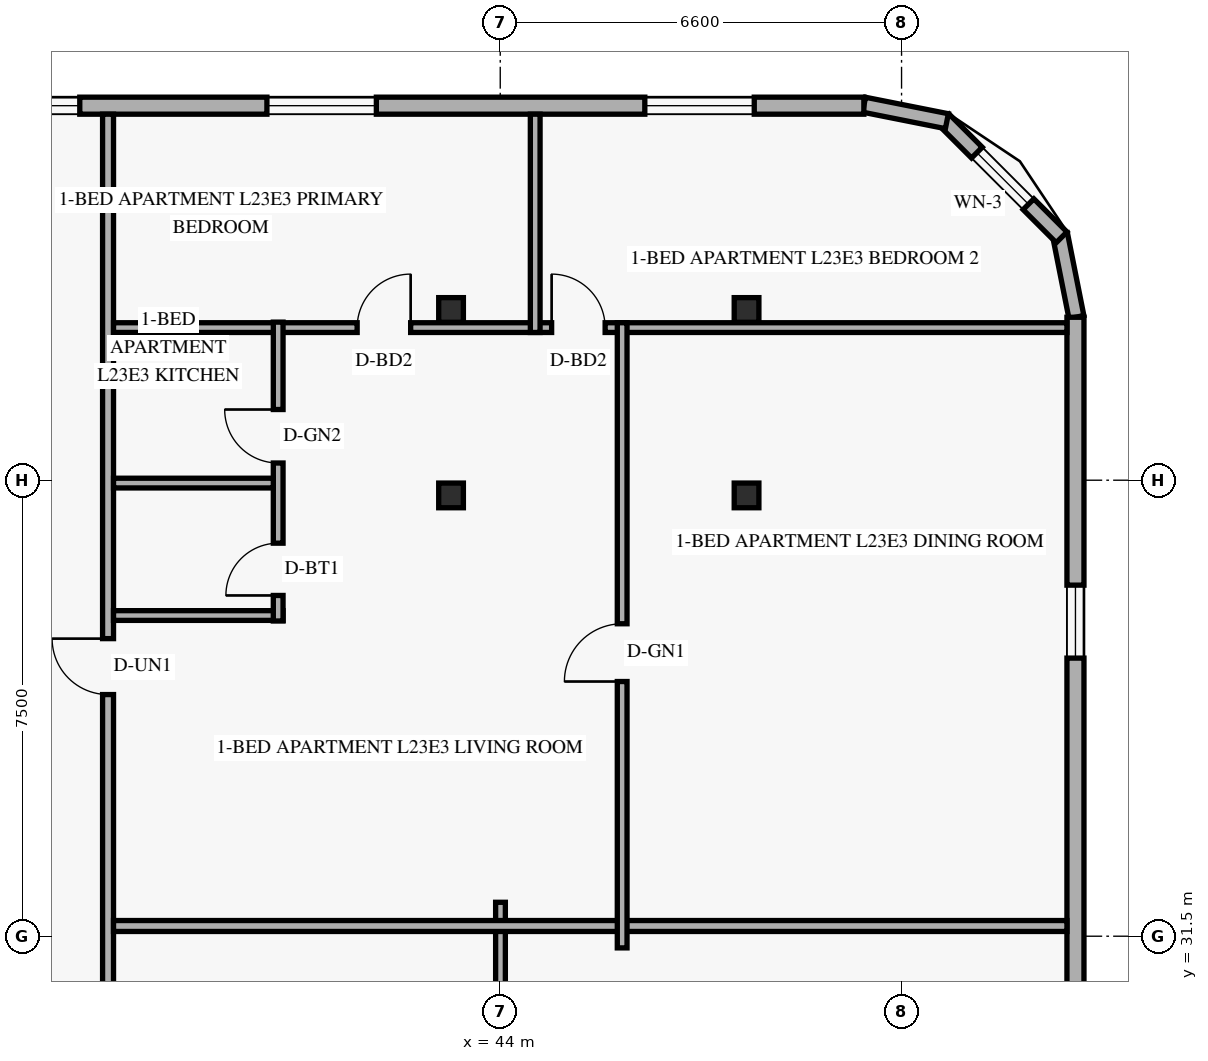
"""IFC4 building model, lengths in metres.
Left out: names, types, materials, properties, quantities, classifications, styles, units other than length and angle.
Written with IfcOpenShell. Run it as: python <this file> out.ifc"""

import sys

from ifc_helpers import new_model, si_unit, direction, frame, frame_2d, origin, origin_2d, place, context, subcontext, project, spatial, rectangle, hollow_rectangle, extrude, element, fill, save


model = new_model("IFC4")
c1 = context("Model", 3, precision=1e-05, world=origin(), true_north=direction((0.0, 1.0)))
c2 = subcontext(c1, "Body", "Model", "MODEL_VIEW")
j1 = project(units=[si_unit("LENGTHUNIT", "METRE"), si_unit("PLANEANGLEUNIT", "RADIAN")], contexts=[c1])
p1 = place(None, origin())
s1 = spatial("IfcSite", under=j1, at=p1, CompositionType="ELEMENT")
p2 = place(p1, origin())
s2 = spatial("IfcBuilding", under=s1, at=p2, CompositionType="ELEMENT")
p3 = place(p2, frame((0.0, 0.0, 91.2)))
s3 = spatial("IfcBuildingStorey", under=s2, at=p3, CompositionType="ELEMENT", Elevation=91.2)
for number, where, z_axis, x_axis in (
    (1, (43.128, 38.75, 0.0), (0.035, 0.0, 0.999), (0.0, 1.0, 0.0)),
    (2, (43.128, 41.8, 0.0), (0.035, 0.0, 0.999), (0.0, 1.0, 0.0)),
):
    element("IfcColumn", number, at=place(p3, frame(where, z_axis=z_axis, x_axis=x_axis)), inside=s3, PredefinedType="COLUMN", context=c2, shape_type="SweptSolid", body=[
        extrude(hollow_rectangle(XDim=0.406, YDim=0.406, WallThickness=0.016, at=origin_2d()), origin(), (0.0, 0.0, 1.0), 3.602),
    ])
for number, where, z_axis, x_axis in (
    (3, (47.946, 38.75, 0.0), (0.058, 0.0, 0.998), (0.0, 1.0, 0.0)),
    (4, (47.946, 41.8, 0.0), (0.058, 0.0, 0.998), (0.0, 1.0, 0.0)),
):
    element("IfcColumn", number, at=place(p3, frame(where, z_axis=z_axis, x_axis=x_axis)), inside=s3, PredefinedType="COLUMN", context=c2, shape_type="SweptSolid", body=[
        extrude(hollow_rectangle(XDim=0.406, YDim=0.406, WallThickness=0.016, at=origin_2d()), origin(), (0.0, 0.0, 1.0), 3.606),
    ])
p4 = place(p3, frame((53.476, 41.684, 0.0), z_axis=(0.0, 0.0, 1.0), x_axis=(-0.195000137217, 0.980803214965, 0.0)))
e5 = element("IfcWall", 5, at=p4, inside=s3, PredefinedType="SOLIDWALL", context=c2, shape_type="SweptSolid", body=[
    extrude(rectangle(XDim=1.388, YDim=0.25, at=frame_2d((0.694, 0.0))), origin(), (0.0, 0.0, 1.0), 3.36),
])
p5 = place(p3, frame((53.232, 42.995, 0.0), z_axis=(0.0, 0.0, 1.0), x_axis=(-0.707151344399, 0.707062215165, 0.0)))
e6 = element("IfcWall", 6, at=p5, inside=s3, PredefinedType="SOLIDWALL", context=c2, shape_type="SweptSolid", body=[
    extrude(rectangle(XDim=2.739, YDim=0.25, at=frame_2d((1.37, 0.0))), origin(), (0.0, 0.0, 1.0), 3.36),
])
p6 = place(p5, frame((0.77, 0.0, 0.85)))
e7 = element("IfcOpeningElement", 7, at=p6, cuts=e6, PredefinedType="OPENING", context=c2, shape_type="SweptSolid", body=[
    extrude(rectangle(XDim=1.2, YDim=1.5, at=frame_2d((0.6, 0.75))), frame((0.0, 0.135, 0.0), z_axis=(0.0, -1.0, 0.0), x_axis=(1.0, 0.0, 0.0)), (0.0, 0.0, 1.0), 0.27),
])
p7 = place(p3, frame((51.345, 44.905, 0.0), z_axis=(0.0, 0.0, 1.0), x_axis=(-0.980809899341, 0.19496651342, 0.0)))
e8 = element("IfcWall", 8, at=p7, inside=s3, PredefinedType="SOLIDWALL", context=c2, shape_type="SweptSolid", body=[
    extrude(rectangle(XDim=1.389, YDim=0.25, at=frame_2d((0.694, 0.0))), origin(), (0.0, 0.0, 1.0), 3.36),
])
p8 = place(p3, frame((53.46, 6.32, 0.0), z_axis=(0.0, 0.0, 1.0), x_axis=(0.0, 1.0, 0.0)))
e9 = element("IfcWall", 9, at=p8, inside=s3, PredefinedType="SOLIDWALL", context=c2, shape_type="SweptSolid", body=[
    extrude(rectangle(XDim=35.36, YDim=0.28, at=frame_2d((17.68, 0.0))), origin(), (0.0, 0.0, 1.0), 3.36),
])
p9 = place(p8, frame((4.832, 0.0, 0.85)))
e10 = element("IfcOpeningElement", 10, at=p9, cuts=e9, PredefinedType="OPENING", context=c2, shape_type="SweptSolid", body=[
    extrude(rectangle(XDim=1.2, YDim=1.5, at=frame_2d((0.6, 0.75))), frame((0.0, 0.15, 0.0), z_axis=(0.0, -1.0, 0.0), x_axis=(1.0, 0.0, 0.0)), (0.0, 0.0, 1.0), 0.3),
])
p10 = place(p8, frame((15.511, 0.0, 0.85)))
e11 = element("IfcOpeningElement", 11, at=p10, cuts=e9, PredefinedType="OPENING", context=c2, shape_type="SweptSolid", body=[
    extrude(rectangle(XDim=1.2, YDim=1.5, at=frame_2d((0.6, 0.75))), frame((0.0, 0.15, 0.0), z_axis=(0.0, -1.0, 0.0), x_axis=(1.0, 0.0, 0.0)), (0.0, 0.0, 1.0), 0.3),
])
p11 = place(p8, frame((22.753, 0.0, 0.85)))
e12 = element("IfcOpeningElement", 12, at=p11, cuts=e9, PredefinedType="OPENING", context=c2, shape_type="SweptSolid", body=[
    extrude(rectangle(XDim=1.2, YDim=1.5, at=frame_2d((0.6, 0.75))), frame((0.0, 0.15, 0.0), z_axis=(0.0, -1.0, 0.0), x_axis=(1.0, 0.0, 0.0)), (0.0, 0.0, 1.0), 0.3),
])
p12 = place(p8, frame((29.754, 0.0, 0.85)))
e13 = element("IfcOpeningElement", 13, at=p12, cuts=e9, PredefinedType="OPENING", context=c2, shape_type="SweptSolid", body=[
    extrude(rectangle(XDim=1.2, YDim=1.5, at=frame_2d((0.6, 0.75))), frame((0.0, 0.15, 0.0), z_axis=(0.0, -1.0, 0.0), x_axis=(1.0, 0.0, 0.0)), (0.0, 0.0, 1.0), 0.3),
])
p13 = place(p3, frame((49.98, 45.16, 0.0), z_axis=(0.0, 0.0, 1.0), x_axis=(-1.0, 0.0, 0.0)))
e14 = element("IfcWall", 14, at=p13, inside=s3, PredefinedType="SOLIDWALL", context=c2, shape_type="SweptSolid", body=[
    extrude(rectangle(XDim=36.56, YDim=0.28, at=frame_2d((18.28, 0.0))), origin(), (0.0, 0.0, 1.0), 3.36),
])
p14 = place(p13, frame((31.545, 0.0, 0.85)))
e15 = element("IfcOpeningElement", 15, at=p14, cuts=e14, PredefinedType="OPENING", context=c2, shape_type="SweptSolid", body=[
    extrude(rectangle(XDim=1.8, YDim=1.6, at=frame_2d((0.9, 0.8))), frame((0.0, 0.15, 0.0), z_axis=(0.0, -1.0, 0.0), x_axis=(1.0, 0.0, 0.0)), (0.0, 0.0, 1.0), 0.3),
])
p15 = place(p13, frame((26.68, 0.0, 0.85)))
e16 = element("IfcOpeningElement", 16, at=p15, cuts=e14, PredefinedType="OPENING", context=c2, shape_type="SweptSolid", body=[
    extrude(rectangle(XDim=1.2, YDim=1.5, at=frame_2d((0.6, 0.75))), frame((0.0, 0.15, 0.0), z_axis=(0.0, -1.0, 0.0), x_axis=(1.0, 0.0, 0.0)), (0.0, 0.0, 1.0), 0.3),
])
p16 = place(p13, frame((22.237, 0.0, 0.85)))
e17 = element("IfcOpeningElement", 17, at=p16, cuts=e14, PredefinedType="OPENING", context=c2, shape_type="SweptSolid", body=[
    extrude(rectangle(XDim=1.8, YDim=1.6, at=frame_2d((0.9, 0.8))), frame((0.0, 0.15, 0.0), z_axis=(0.0, -1.0, 0.0), x_axis=(1.0, 0.0, 0.0)), (0.0, 0.0, 1.0), 0.3),
])
p17 = place(p13, frame((16.402, 0.0, 0.85)))
e18 = element("IfcOpeningElement", 18, at=p17, cuts=e14, PredefinedType="OPENING", context=c2, shape_type="SweptSolid", body=[
    extrude(rectangle(XDim=1.8, YDim=1.6, at=frame_2d((0.9, 0.8))), frame((0.0, 0.15, 0.0), z_axis=(0.0, -1.0, 0.0), x_axis=(1.0, 0.0, 0.0)), (0.0, 0.0, 1.0), 0.3),
])
p18 = place(p13, frame((12.895, 0.0, 0.85)))
e19 = element("IfcOpeningElement", 19, at=p18, cuts=e14, PredefinedType="OPENING", context=c2, shape_type="SweptSolid", body=[
    extrude(rectangle(XDim=1.2, YDim=1.5, at=frame_2d((0.6, 0.75))), frame((0.0, 0.15, 0.0), z_axis=(0.0, -1.0, 0.0), x_axis=(1.0, 0.0, 0.0)), (0.0, 0.0, 1.0), 0.3),
])
p19 = place(p13, frame((8.017, 0.0, 0.85)))
e20 = element("IfcOpeningElement", 20, at=p19, cuts=e14, PredefinedType="OPENING", context=c2, shape_type="SweptSolid", body=[
    extrude(rectangle(XDim=1.8, YDim=1.6, at=frame_2d((0.9, 0.8))), frame((0.0, 0.15, 0.0), z_axis=(0.0, -1.0, 0.0), x_axis=(1.0, 0.0, 0.0)), (0.0, 0.0, 1.0), 0.3),
])
p20 = place(p13, frame((1.802, 0.0, 0.85)))
e21 = element("IfcOpeningElement", 21, at=p20, cuts=e14, PredefinedType="OPENING", context=c2, shape_type="SweptSolid", body=[
    extrude(rectangle(XDim=1.8, YDim=1.6, at=frame_2d((0.9, 0.8))), frame((0.0, 0.15, 0.0), z_axis=(0.0, -1.0, 0.0), x_axis=(1.0, 0.0, 0.0)), (0.0, 0.0, 1.0), 0.3),
])
p21 = place(p3, frame((37.55, 2.98, 0.0), z_axis=(0.0, 0.0, 1.0), x_axis=(0.0, 1.0, 0.0)))
e22 = element("IfcWall", 22, at=p21, inside=s3, PredefinedType="STANDARD", context=c2, shape_type="SweptSolid", body=[
    extrude(rectangle(XDim=42.04, YDim=0.18, at=frame_2d((21.02, 0.0))), origin(), (0.0, 0.0, 1.0), 2.731),
])
p22 = place(p21, frame((8.264, 0.0, 0.0)))
e23 = element("IfcOpeningElement", 23, at=p22, cuts=e22, PredefinedType="OPENING", context=c2, shape_type="SweptSolid", body=[
    extrude(rectangle(XDim=0.92, YDim=2.15, at=frame_2d((0.46, 1.075))), frame((0.0, 0.1, 0.0), z_axis=(0.0, -1.0, 0.0), x_axis=(1.0, 0.0, 0.0)), (0.0, 0.0, 1.0), 0.2),
])
p23 = place(p21, frame((18.691, 0.0, 0.0)))
e24 = element("IfcOpeningElement", 24, at=p23, cuts=e22, PredefinedType="OPENING", context=c2, shape_type="SweptSolid", body=[
    extrude(rectangle(XDim=0.92, YDim=2.15, at=frame_2d((0.46, 1.075))), frame((0.0, 0.1, 0.0), z_axis=(0.0, -1.0, 0.0), x_axis=(1.0, 0.0, 0.0)), (0.0, 0.0, 1.0), 0.2),
])
p24 = place(p21, frame((32.494, 0.0, 0.0)))
e25 = element("IfcOpeningElement", 25, at=p24, cuts=e22, PredefinedType="OPENING", context=c2, shape_type="SweptSolid", body=[
    extrude(rectangle(XDim=0.92, YDim=2.15, at=frame_2d((0.46, 1.075))), frame((0.0, 0.1, 0.0), z_axis=(0.0, -1.0, 0.0), x_axis=(1.0, 0.0, 0.0)), (0.0, 0.0, 1.0), 0.2),
])
p25 = place(p3, frame((44.004, 27.598, 0.0), z_axis=(0.0, 0.0, 1.0), x_axis=(0.0, 1.0, 0.0)))
e26 = element("IfcWall", 26, at=p25, inside=s3, PredefinedType="PARTITIONING", context=c2, shape_type="SweptSolid", body=[
    extrude(rectangle(XDim=4.46, YDim=0.16, at=frame_2d((2.23, 0.0))), origin(), (0.0, 0.0, 1.0), 2.731),
])
p26 = place(p3, frame((37.64, 31.668, 0.0), z_axis=(0.0, 0.0, 1.0), x_axis=(1.0, 0.0, 0.0)))
e27 = element("IfcWall", 27, at=p26, inside=s3, PredefinedType="PARTITIONING", context=c2, shape_type="SweptSolid", body=[
    extrude(rectangle(XDim=15.68, YDim=0.18, at=frame_2d((7.84, 0.0))), origin(), (0.0, 0.0, 1.0), 2.731),
])
p27 = place(p3, frame((37.64, 41.51, 0.0), z_axis=(0.0, 0.0, 1.0), x_axis=(1.0, 0.0, 0.0)))
e28 = element("IfcWall", 28, at=p27, inside=s3, PredefinedType="PARTITIONING", context=c2, shape_type="SweptSolid", body=[
    extrude(rectangle(XDim=15.68, YDim=0.16, at=frame_2d((7.84, 0.0))), origin(), (0.0, 0.0, 1.0), 2.731),
])
p28 = place(p27, frame((4.007, 0.0, 0.0)))
e29 = element("IfcOpeningElement", 29, at=p28, cuts=e28, PredefinedType="OPENING", context=c2, shape_type="SweptSolid", body=[
    extrude(rectangle(XDim=0.88, YDim=2.14, at=frame_2d((0.44, 1.07))), frame((0.0, 0.09, 0.0), z_axis=(0.0, -1.0, 0.0), x_axis=(1.0, 0.0, 0.0)), (0.0, 0.0, 1.0), 0.18),
])
p29 = place(p27, frame((7.205, 0.0, 0.0)))
e30 = element("IfcOpeningElement", 30, at=p29, cuts=e28, PredefinedType="OPENING", context=c2, shape_type="SweptSolid", body=[
    extrude(rectangle(XDim=0.88, YDim=2.14, at=frame_2d((0.44, 1.07))), frame((0.0, 0.09, 0.0), z_axis=(0.0, -1.0, 0.0), x_axis=(1.0, 0.0, 0.0)), (0.0, 0.0, 1.0), 0.18),
])
p30 = place(p3, frame((37.64, 36.774, 0.0), z_axis=(0.0, 0.0, 1.0), x_axis=(1.0, 0.0, 0.0)))
e31 = element("IfcWall", 31, at=p30, inside=s3, PredefinedType="PLUMBINGWALL", context=c2, shape_type="SweptSolid", body=[
    extrude(rectangle(XDim=2.788, YDim=0.16, at=frame_2d((1.394, 0.0))), origin(), (0.0, 0.0, 1.0), 3.36),
])
p31 = place(p3, frame((40.348, 36.685, 0.0), z_axis=(0.0, 0.0, 1.0), x_axis=(0.0, 1.0, 0.0)))
e32 = element("IfcWall", 32, at=p31, inside=s3, PredefinedType="PLUMBINGWALL", context=c2, shape_type="SweptSolid", body=[
    extrude(rectangle(XDim=4.916, YDim=0.16, at=frame_2d((2.458, 0.0))), origin(), (0.0, 0.0, 1.0), 2.731),
])
p32 = place(p31, frame((0.42, 0.0, 0.0)))
e33 = element("IfcOpeningElement", 33, at=p32, cuts=e32, PredefinedType="OPENING", context=c2, shape_type="SweptSolid", body=[
    extrude(rectangle(XDim=0.86, YDim=2.12, at=frame_2d((0.43, 1.06))), frame((0.0, 0.09, 0.0), z_axis=(0.0, -1.0, 0.0), x_axis=(1.0, 0.0, 0.0)), (0.0, 0.0, 1.0), 0.18),
])
p33 = place(p31, frame((2.598, 0.0, 0.0)))
e34 = element("IfcOpeningElement", 34, at=p33, cuts=e32, PredefinedType="OPENING", context=c2, shape_type="SweptSolid", body=[
    extrude(rectangle(XDim=0.88, YDim=2.12, at=frame_2d((0.44, 1.06))), frame((0.0, 0.09, 0.0), z_axis=(0.0, -1.0, 0.0), x_axis=(1.0, 0.0, 0.0)), (0.0, 0.0, 1.0), 0.18),
])
p34 = place(p3, frame((37.64, 38.953, 0.0), z_axis=(0.0, 0.0, 1.0), x_axis=(1.0, 0.0, 0.0)))
e35 = element("IfcWall", 35, at=p34, inside=s3, PredefinedType="PLUMBINGWALL", context=c2, shape_type="SweptSolid", body=[
    extrude(rectangle(XDim=2.628, YDim=0.16, at=frame_2d((1.314, 0.0))), origin(), (0.0, 0.0, 1.0), 2.731),
])
p35 = place(p3, frame((46.005, 31.308, 0.0), z_axis=(0.0, 0.0, 1.0), x_axis=(0.0, 1.0, 0.0)))
e36 = element("IfcWall", 36, at=p35, inside=s3, PredefinedType="PARTITIONING", context=c2, shape_type="SweptSolid", body=[
    extrude(rectangle(XDim=10.282, YDim=0.16, at=frame_2d((5.141, 0.0))), origin(), (0.0, 0.0, 1.0), 2.731),
])
p36 = place(p35, frame((4.381, 0.0, 0.0)))
e37 = element("IfcOpeningElement", 37, at=p36, cuts=e36, PredefinedType="OPENING", context=c2, shape_type="SweptSolid", body=[
    extrude(rectangle(XDim=0.95, YDim=2.15, at=frame_2d((0.475, 1.075))), frame((0.0, 0.09, 0.0), z_axis=(0.0, -1.0, 0.0), x_axis=(1.0, 0.0, 0.0)), (0.0, 0.0, 1.0), 0.18),
])
p37 = place(p3, frame((44.575, 41.43, 0.0), z_axis=(0.0, 0.0, 1.0), x_axis=(0.0, 1.0, 0.0)))
e38 = element("IfcWall", 38, at=p37, inside=s3, PredefinedType="PARTITIONING", context=c2, shape_type="SweptSolid", body=[
    extrude(rectangle(XDim=3.59, YDim=0.16, at=frame_2d((1.795, 0.0))), origin(), (0.0, 0.0, 1.0), 2.809),
])
p38 = place(p6, origin())
e39 = element("IfcWindow", 39, at=p38, inside=s3, PartitioningType="SINGLE_PANEL", PredefinedType="WINDOW", context=c2, shape_type="SweptSolid", body=[
    extrude(rectangle(XDim=1.2, YDim=1.5, at=frame_2d((0.6, 0.75))), frame((0.0, 0.03, 0.0), z_axis=(0.0, -1.0, 0.0), x_axis=(1.0, 0.0, 0.0)), (0.0, 0.0, 1.0), 0.06),
])
fill(e7, e39)
p39 = place(p12, origin())
e40 = element("IfcWindow", 40, at=p39, inside=s3, PartitioningType="SINGLE_PANEL", PredefinedType="WINDOW", context=c2, shape_type="SweptSolid", body=[
    extrude(rectangle(XDim=1.2, YDim=1.5, at=frame_2d((0.6, 0.75))), frame((0.0, 0.03, 0.0), z_axis=(0.0, -1.0, 0.0), x_axis=(1.0, 0.0, 0.0)), (0.0, 0.0, 1.0), 0.06),
])
fill(e13, e40)
p40 = place(p18, origin())
e41 = element("IfcWindow", 41, at=p40, inside=s3, PartitioningType="SINGLE_PANEL", PredefinedType="WINDOW", context=c2, shape_type="SweptSolid", body=[
    extrude(rectangle(XDim=1.2, YDim=1.5, at=frame_2d((0.6, 0.75))), frame((0.0, 0.03, 0.0), z_axis=(0.0, -1.0, 0.0), x_axis=(1.0, 0.0, 0.0)), (0.0, 0.0, 1.0), 0.06),
])
fill(e19, e41)
p41 = place(p19, origin())
e42 = element("IfcWindow", 42, at=p41, inside=s3, PartitioningType="SINGLE_PANEL", PredefinedType="WINDOW", context=c2, shape_type="SweptSolid", body=[
    extrude(rectangle(XDim=1.8, YDim=1.6, at=frame_2d((0.9, 0.8))), frame((0.0, 0.03, 0.0), z_axis=(0.0, -1.0, 0.0), x_axis=(1.0, 0.0, 0.0)), (0.0, 0.0, 1.0), 0.06),
])
fill(e20, e42)
p42 = place(p20, origin())
e43 = element("IfcWindow", 43, at=p42, inside=s3, PartitioningType="SINGLE_PANEL", PredefinedType="WINDOW", context=c2, shape_type="SweptSolid", body=[
    extrude(rectangle(XDim=1.8, YDim=1.6, at=frame_2d((0.9, 0.8))), frame((0.0, 0.03, 0.0), z_axis=(0.0, -1.0, 0.0), x_axis=(1.0, 0.0, 0.0)), (0.0, 0.0, 1.0), 0.06),
])
fill(e21, e43)
p43 = place(p36, origin())
e44 = element("IfcDoor", 44, at=p43, inside=s3, OperationType="SINGLE_SWING_LEFT", PredefinedType="DOOR", context=c2, shape_type="SweptSolid", body=[
    extrude(rectangle(XDim=0.95, YDim=2.15, at=frame_2d((0.475, 1.075))), frame((0.0, 0.025, 0.0), z_axis=(0.0, -1.0, 0.0), x_axis=(1.0, 0.0, 0.0)), (0.0, 0.0, 1.0), 0.05),
])
fill(e37, e44)
p44 = place(p24, origin())
e45 = element("IfcDoor", 45, at=p44, inside=s3, OperationType="SINGLE_SWING_RIGHT", PredefinedType="DOOR", context=c2, shape_type="SweptSolid", body=[
    extrude(rectangle(XDim=0.92, YDim=2.15, at=frame_2d((0.46, 1.075))), frame((0.0, 0.025, 0.0), z_axis=(0.0, -1.0, 0.0), x_axis=(1.0, 0.0, 0.0)), (0.0, 0.0, 1.0), 0.05),
])
fill(e25, e45)
p45 = place(p32, origin())
e46 = element("IfcDoor", 46, at=p45, inside=s3, OperationType="SINGLE_SWING_LEFT", PredefinedType="DOOR", context=c2, shape_type="SweptSolid", body=[
    extrude(rectangle(XDim=0.86, YDim=2.12, at=frame_2d((0.43, 1.06))), frame((0.0, 0.025, 0.0), z_axis=(0.0, -1.0, 0.0), x_axis=(1.0, 0.0, 0.0)), (0.0, 0.0, 1.0), 0.05),
])
fill(e33, e46)
p46 = place(p33, origin())
e47 = element("IfcDoor", 47, at=p46, inside=s3, OperationType="SINGLE_SWING_RIGHT", PredefinedType="DOOR", context=c2, shape_type="SweptSolid", body=[
    extrude(rectangle(XDim=0.88, YDim=2.12, at=frame_2d((0.44, 1.06))), frame((0.0, 0.025, 0.0), z_axis=(0.0, -1.0, 0.0), x_axis=(1.0, 0.0, 0.0)), (0.0, 0.0, 1.0), 0.05),
])
fill(e34, e47)
p47 = place(p28, origin())
e48 = element("IfcDoor", 48, at=p47, inside=s3, OperationType="SINGLE_SWING_RIGHT", PredefinedType="DOOR", context=c2, shape_type="SweptSolid", body=[
    extrude(rectangle(XDim=0.88, YDim=2.14, at=frame_2d((0.44, 1.07))), frame((0.0, 0.025, 0.0), z_axis=(0.0, -1.0, 0.0), x_axis=(1.0, 0.0, 0.0)), (0.0, 0.0, 1.0), 0.05),
])
fill(e29, e48)
p48 = place(p29, origin())
e49 = element("IfcDoor", 49, at=p48, inside=s3, OperationType="SINGLE_SWING_LEFT", PredefinedType="DOOR", context=c2, shape_type="SweptSolid", body=[
    extrude(rectangle(XDim=0.88, YDim=2.14, at=frame_2d((0.44, 1.07))), frame((0.0, 0.025, 0.0), z_axis=(0.0, -1.0, 0.0), x_axis=(1.0, 0.0, 0.0)), (0.0, 0.0, 1.0), 0.05),
])
fill(e30, e49)
save(model, sys.argv[1])
